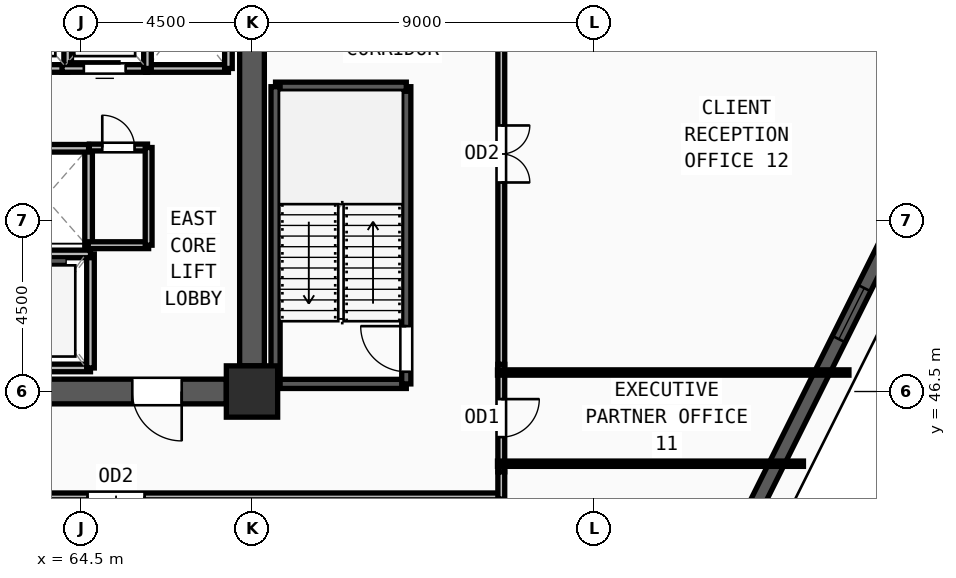
"""IFC4 building model, lengths in metres.
Left out: names, types, materials, properties, quantities, classifications, styles, units other than length and angle.
Written with IfcOpenShell. Run it as: python <this file> out.ifc"""

import sys

from ifc_helpers import new_model, si_unit, direction, frame, frame_2d, origin, origin_2d, place, context, subcontext, project, spatial, rectangle, extrude, source, transform, mapped, element, fill, save


model = new_model("IFC4")
c1 = context("Model", 3, precision=1e-05, world=origin(), true_north=direction((0.0, 1.0)))
c2 = subcontext(c1, "Body", "Model", "MODEL_VIEW")
j1 = project(units=[si_unit("LENGTHUNIT", "METRE"), si_unit("PLANEANGLEUNIT", "RADIAN")], contexts=[c1])
p1 = place(None, origin())
s1 = spatial("IfcSite", under=j1, at=p1, CompositionType="ELEMENT")
p2 = place(p1, origin())
s2 = spatial("IfcBuilding", under=s1, at=p2, CompositionType="ELEMENT")
p3 = place(p2, frame((0.0, 0.0, 194.25)))
s3 = spatial("IfcBuildingStorey", under=s2, at=p3, CompositionType="ELEMENT", Elevation=194.25)
m1 = source(origin(), c2, "Body", "SweptSolid", [
    extrude(rectangle(XDim=1.35, YDim=1.35, at=origin_2d()), origin(), (0.0, 0.0, 1.0), 3.75),
])
p4 = place(p3, frame((69.0, 46.5, 0.0), z_axis=(0.0, 0.0, 1.0), x_axis=(1.0, 0.0, 0.0)))
e1 = element("IfcColumn", 1, at=p4, inside=s3, PredefinedType="COLUMN", context=c2, shape_type="MappedRepresentation", body=[
    mapped(m1, transform((0.0, 0.0, 0.0), x_axis=(1.0, 0.0, 0.0), y_axis=(0.0, 1.0, 0.0), z_axis=(0.0, 0.0, 1.0), scale=1.0)),
])
p5 = place(p3, frame((80.452, 39.875, 0.0), z_axis=(0.0, 0.0, 1.0), x_axis=(0.446173861236, 0.894946303166, 0.0)))
e2 = element("IfcWall", 2, at=p5, inside=s3, PredefinedType="SOLIDWALL", context=c2, shape_type="SweptSolid", body=[
    extrude(rectangle(XDim=29.97, YDim=0.38, at=frame_2d((14.985, 0.0))), origin(), (0.0, 0.0, 1.0), 3.57),
])
m2 = source(origin(), c2, "Body", "SweptSolid", [
    extrude(rectangle(XDim=1.5, YDim=1.9, at=frame_2d((0.75, 0.95))), frame((0.0, 0.2, 0.0), z_axis=(0.0, -1.0, 0.0), x_axis=(1.0, 0.0, 0.0)), (0.0, 0.0, 1.0), 0.4),
])
p6 = place(p5, frame((8.943, 0.0, 0.55)))
e3 = element("IfcOpeningElement", 3, at=p6, cuts=e2, PredefinedType="OPENING", context=c2, shape_type="MappedRepresentation", body=[
    mapped(m2, transform((0.0, 0.0, 0.0), x_axis=(1.0, 0.0, 0.0), y_axis=(0.0, 1.0, 0.0), z_axis=(0.0, 0.0, 1.0), scale=1.0)),
])
p7 = place(p5, frame((14.235, 0.0, 0.55)))
e4 = element("IfcOpeningElement", 4, at=p7, cuts=e2, PredefinedType="OPENING", context=c2, shape_type="MappedRepresentation", body=[
    mapped(m2, transform((0.0, 0.0, 0.0), x_axis=(1.0, 0.0, 0.0), y_axis=(0.0, 1.0, 0.0), z_axis=(0.0, 0.0, 1.0), scale=1.0)),
])
p8 = place(p5, frame((21.728, 0.0, 0.55)))
e5 = element("IfcOpeningElement", 5, at=p8, cuts=e2, PredefinedType="OPENING", context=c2, shape_type="MappedRepresentation", body=[
    mapped(m2, transform((0.0, 0.0, 0.0), x_axis=(1.0, 0.0, 0.0), y_axis=(0.0, 1.0, 0.0), z_axis=(0.0, 0.0, 1.0), scale=1.0)),
])
p9 = place(p3, frame((69.0, 60.825, 0.0), z_axis=(0.0, 0.0, 1.0), x_axis=(0.0, -1.0, 0.0)))
e6 = element("IfcWall", 6, at=p9, inside=s3, PredefinedType="SHEAR", context=c2, shape_type="SweptSolid", body=[
    extrude(rectangle(XDim=13.65, YDim=0.65, at=frame_2d((6.825, 0.0))), origin(), (0.0, 0.0, 1.0), 3.57),
])
m3 = source(origin(), c2, "Body", "SweptSolid", [
    extrude(rectangle(XDim=1.2, YDim=2.2, at=frame_2d((0.6, 1.1))), frame((0.0, 0.335, 0.0), z_axis=(0.0, -1.0, 0.0), x_axis=(1.0, 0.0, 0.0)), (0.0, 0.0, 1.0), 0.67),
])
p10 = place(p9, frame((1.275, 0.0, 0.0)))
e7 = element("IfcOpeningElement", 7, at=p10, cuts=e6, PredefinedType="OPENING", context=c2, shape_type="MappedRepresentation", body=[
    mapped(m3, transform((0.0, 0.0, 0.0), x_axis=(1.0, 0.0, 0.0), y_axis=(0.0, 1.0, 0.0), z_axis=(0.0, 0.0, 1.0), scale=1.0)),
])
p11 = place(p3, frame((68.325, 46.5, 0.0), z_axis=(0.0, 0.0, 1.0), x_axis=(-1.0, 0.0, 0.0)))
e8 = element("IfcWall", 8, at=p11, inside=s3, PredefinedType="SHEAR", context=c2, shape_type="SweptSolid", body=[
    extrude(rectangle(XDim=7.65, YDim=0.65, at=frame_2d((3.825, 0.0))), origin(), (0.0, 0.0, 1.0), 3.57),
])
m4 = source(origin(), c2, "Body", "SweptSolid", [
    extrude(rectangle(XDim=1.3, YDim=2.2, at=frame_2d((0.65, 1.1))), frame((0.0, 0.335, 0.0), z_axis=(0.0, -1.0, 0.0), x_axis=(1.0, 0.0, 0.0)), (0.0, 0.0, 1.0), 0.67),
])
p12 = place(p11, frame((1.175, 0.0, 0.0)))
e9 = element("IfcOpeningElement", 9, at=p12, cuts=e8, PredefinedType="OPENING", context=c2, shape_type="MappedRepresentation", body=[
    mapped(m4, transform((0.0, 0.0, 0.0), x_axis=(1.0, 0.0, 0.0), y_axis=(0.0, 1.0, 0.0), z_axis=(0.0, 0.0, 1.0), scale=1.0)),
])
p13 = place(p3, frame((69.62, 46.7, 0.0), z_axis=(0.0, 0.0, 1.0), x_axis=(1.0, 0.0, 0.0)))
e10 = element("IfcWall", 10, at=p13, inside=s3, PredefinedType="SOLIDWALL", context=c2, shape_type="SweptSolid", body=[
    extrude(rectangle(XDim=3.44, YDim=0.24, at=frame_2d((1.72, 0.0))), origin(), (0.0, 0.0, 1.0), 3.57),
])
p14 = place(p3, frame((73.06, 46.7, 0.0), z_axis=(0.0, 0.0, 1.0), x_axis=(0.0, 1.0, 0.0)))
e11 = element("IfcWall", 11, at=p14, inside=s3, PredefinedType="SOLIDWALL", context=c2, shape_type="SweptSolid", body=[
    extrude(rectangle(XDim=7.82, YDim=0.24, at=frame_2d((3.91, 0.0))), origin(), (0.0, 0.0, 1.0), 3.57),
])
m5 = source(origin(), c2, "Body", "SweptSolid", [
    extrude(rectangle(XDim=1.2, YDim=2.2, at=frame_2d((0.6, 1.1))), frame((0.0, 0.13, 0.0), z_axis=(0.0, -1.0, 0.0), x_axis=(1.0, 0.0, 0.0)), (0.0, 0.0, 1.0), 0.26),
])
p15 = place(p14, frame((0.32, 0.0, 0.0)))
e12 = element("IfcOpeningElement", 12, at=p15, cuts=e11, PredefinedType="OPENING", context=c2, shape_type="MappedRepresentation", body=[
    mapped(m5, transform((0.0, 0.0, 0.0), x_axis=(1.0, 0.0, 0.0), y_axis=(0.0, 1.0, 0.0), z_axis=(0.0, 0.0, 1.0), scale=1.0)),
])
p16 = place(p3, frame((73.06, 54.52, 0.0), z_axis=(0.0, 0.0, 1.0), x_axis=(-1.0, 0.0, 0.0)))
e13 = element("IfcWall", 13, at=p16, inside=s3, PredefinedType="SOLIDWALL", context=c2, shape_type="SweptSolid", body=[
    extrude(rectangle(XDim=3.44, YDim=0.24, at=frame_2d((1.72, 0.0))), origin(), (0.0, 0.0, 1.0), 3.57),
])
p17 = place(p3, frame((69.62, 54.52, 0.0), z_axis=(0.0, 0.0, 1.0), x_axis=(0.0, -1.0, 0.0)))
e14 = element("IfcWall", 14, at=p17, inside=s3, PredefinedType="SOLIDWALL", context=c2, shape_type="SweptSolid", body=[
    extrude(rectangle(XDim=7.82, YDim=0.24, at=frame_2d((3.91, 0.0))), origin(), (0.0, 0.0, 1.0), 3.57),
])
p18 = place(p3, frame((62.35, 47.12, 0.0), z_axis=(0.0, 0.0, 1.0), x_axis=(1.0, 0.0, 0.0)))
e15 = element("IfcWall", 15, at=p18, inside=s3, PredefinedType="SOLIDWALL", context=c2, shape_type="SweptSolid", body=[
    extrude(rectangle(XDim=2.4, YDim=0.2, at=frame_2d((1.2, 0.0))), origin(), (0.0, 0.0, 1.0), 3.57),
])
p19 = place(p3, frame((64.75, 47.12, 0.0), z_axis=(0.0, 0.0, 1.0), x_axis=(0.0, 1.0, 0.0)))
e16 = element("IfcWall", 16, at=p19, inside=s3, PredefinedType="SOLIDWALL", context=c2, shape_type="SweptSolid", body=[
    extrude(rectangle(XDim=3.0, YDim=0.2, at=frame_2d((1.5, 0.0))), origin(), (0.0, 0.0, 1.0), 3.57),
])
p20 = place(p3, frame((64.75, 50.12, 0.0), z_axis=(0.0, 0.0, 1.0), x_axis=(-1.0, 0.0, 0.0)))
e17 = element("IfcWall", 17, at=p20, inside=s3, PredefinedType="SOLIDWALL", context=c2, shape_type="SweptSolid", body=[
    extrude(rectangle(XDim=2.4, YDim=0.2, at=frame_2d((1.2, 0.0))), origin(), (0.0, 0.0, 1.0), 3.57),
])
p21 = place(p3, frame((66.2, 55.0, 0.0), z_axis=(0.0, 0.0, 1.0), x_axis=(1.0, 0.0, 0.0)))
e18 = element("IfcWall", 18, at=p21, inside=s3, PredefinedType="SOLIDWALL", context=c2, shape_type="SweptSolid", body=[
    extrude(rectangle(XDim=2.18, YDim=0.2, at=frame_2d((1.09, 0.0))), origin(), (0.0, 0.0, 1.0), 3.57),
])
p22 = place(p3, frame((68.38, 55.0, 0.0), z_axis=(0.0, 0.0, 1.0), x_axis=(0.0, 1.0, 0.0)))
e19 = element("IfcWall", 19, at=p22, inside=s3, PredefinedType="SOLIDWALL", context=c2, shape_type="SweptSolid", body=[
    extrude(rectangle(XDim=2.75, YDim=0.2, at=frame_2d((1.375, 0.0))), origin(), (0.0, 0.0, 1.0), 3.57),
])
p23 = place(p3, frame((64.7, 50.3, 0.0), z_axis=(0.0, 0.0, 1.0), x_axis=(0.0, 1.0, 0.0)))
e20 = element("IfcWall", 20, at=p23, inside=s3, PredefinedType="SOLIDWALL", context=c2, shape_type="SweptSolid", body=[
    extrude(rectangle(XDim=2.6, YDim=0.2, at=frame_2d((1.3, 0.0))), origin(), (0.0, 0.0, 1.0), 3.57),
])
p24 = place(p3, frame((64.7, 52.9, 0.0), z_axis=(0.0, 0.0, 1.0), x_axis=(-1.0, 0.0, 0.0)))
e21 = element("IfcWall", 21, at=p24, inside=s3, PredefinedType="SOLIDWALL", context=c2, shape_type="SweptSolid", body=[
    extrude(rectangle(XDim=2.3, YDim=0.2, at=frame_2d((1.15, 0.0))), origin(), (0.0, 0.0, 1.0), 3.57),
])
p25 = place(p3, frame((61.9, 55.0, 0.0), z_axis=(0.0, 0.0, 1.0), x_axis=(1.0, 0.0, 0.0)))
e22 = element("IfcWall", 22, at=p25, inside=s3, PredefinedType="SOLIDWALL", context=c2, shape_type="SweptSolid", body=[
    extrude(rectangle(XDim=2.25, YDim=0.2, at=frame_2d((1.125, 0.0))), origin(), (0.0, 0.0, 1.0), 3.57),
])
m6 = source(origin(), c2, "Body", "SweptSolid", [
    extrude(rectangle(XDim=1.1, YDim=2.2, at=frame_2d((0.55, 1.1))), frame((0.0, 0.11, 0.0), z_axis=(0.0, -1.0, 0.0), x_axis=(1.0, 0.0, 0.0)), (0.0, 0.0, 1.0), 0.22),
])
p26 = place(p25, frame((0.575, 0.0, 0.0)))
e23 = element("IfcOpeningElement", 23, at=p26, cuts=e22, PredefinedType="OPENING", context=c2, shape_type="MappedRepresentation", body=[
    mapped(m6, transform((0.0, 0.0, 0.0), x_axis=(1.0, 0.0, 0.0), y_axis=(0.0, 1.0, 0.0), z_axis=(0.0, 0.0, 1.0), scale=1.0)),
])
p27 = place(p3, frame((64.15, 55.0, 0.0), z_axis=(0.0, 0.0, 1.0), x_axis=(0.0, 1.0, 0.0)))
e24 = element("IfcWall", 24, at=p27, inside=s3, PredefinedType="SOLIDWALL", context=c2, shape_type="SweptSolid", body=[
    extrude(rectangle(XDim=2.6, YDim=0.2, at=frame_2d((1.3, 0.0))), origin(), (0.0, 0.0, 1.0), 3.57),
])
p28 = place(p3, frame((64.0, 55.0, 0.0), z_axis=(0.0, 0.0, 1.0), x_axis=(1.0, 0.0, 0.0)))
e25 = element("IfcWall", 25, at=p28, inside=s3, PredefinedType="SOLIDWALL", context=c2, shape_type="SweptSolid", body=[
    extrude(rectangle(XDim=2.25, YDim=0.2, at=frame_2d((1.125, 0.0))), origin(), (0.0, 0.0, 1.0), 3.57),
])
p29 = place(p28, frame((0.575, 0.0, 0.0)))
e26 = element("IfcOpeningElement", 26, at=p29, cuts=e25, PredefinedType="OPENING", context=c2, shape_type="MappedRepresentation", body=[
    mapped(m6, transform((0.0, 0.0, 0.0), x_axis=(1.0, 0.0, 0.0), y_axis=(0.0, 1.0, 0.0), z_axis=(0.0, 0.0, 1.0), scale=1.0)),
])
p30 = place(p3, frame((66.25, 55.0, 0.0), z_axis=(0.0, 0.0, 1.0), x_axis=(0.0, 1.0, 0.0)))
e27 = element("IfcWall", 27, at=p30, inside=s3, PredefinedType="SOLIDWALL", context=c2, shape_type="SweptSolid", body=[
    extrude(rectangle(XDim=2.6, YDim=0.2, at=frame_2d((1.3, 0.0))), origin(), (0.0, 0.0, 1.0), 3.57),
])
p31 = place(p3, frame((64.72, 52.92, 0.0), z_axis=(0.0, 0.0, 1.0), x_axis=(1.0, 0.0, 0.0)))
e28 = element("IfcWall", 28, at=p31, inside=s3, PredefinedType="PARTITIONING", context=c2, shape_type="SweptSolid", body=[
    extrude(rectangle(XDim=1.53, YDim=0.18, at=frame_2d((0.765, 0.0))), origin(), (0.0, 0.0, 1.0), 3.57),
])
m7 = source(origin(), c2, "Body", "SweptSolid", [
    extrude(rectangle(XDim=0.85, YDim=2.1, at=frame_2d((0.425, 1.05))), frame((0.0, 0.1, 0.0), z_axis=(0.0, -1.0, 0.0), x_axis=(1.0, 0.0, 0.0)), (0.0, 0.0, 1.0), 0.2),
])
p32 = place(p31, frame((0.34, 0.0, 0.0)))
e29 = element("IfcOpeningElement", 29, at=p32, cuts=e28, PredefinedType="OPENING", context=c2, shape_type="MappedRepresentation", body=[
    mapped(m7, transform((0.0, 0.0, 0.0), x_axis=(1.0, 0.0, 0.0), y_axis=(0.0, 1.0, 0.0), z_axis=(0.0, 0.0, 1.0), scale=1.0)),
])
p33 = place(p3, frame((75.63, 43.74, 0.0), z_axis=(0.0, 0.0, 1.0), x_axis=(-1.0, 0.0, 0.0)))
e30 = element("IfcWall", 30, at=p33, inside=s3, PredefinedType="PARTITIONING", context=c2, shape_type="SweptSolid", body=[
    extrude(rectangle(XDim=20.415, YDim=0.18, at=frame_2d((10.208, 0.0))), origin(), (0.0, 0.0, 1.0), 3.57),
])
m8 = source(origin(), c2, "Body", "SweptSolid", [
    extrude(rectangle(XDim=1.5, YDim=2.2, at=frame_2d((0.75, 1.1))), frame((0.0, 0.1, 0.0), z_axis=(0.0, -1.0, 0.0), x_axis=(1.0, 0.0, 0.0)), (0.0, 0.0, 1.0), 0.2),
])
p34 = place(p33, frame((9.457, 0.0, 0.0)))
e31 = element("IfcOpeningElement", 31, at=p34, cuts=e30, PredefinedType="OPENING", context=c2, shape_type="MappedRepresentation", body=[
    mapped(m8, transform((0.0, 0.0, 0.0), x_axis=(1.0, 0.0, 0.0), y_axis=(0.0, 1.0, 0.0), z_axis=(0.0, 0.0, 1.0), scale=1.0)),
])
p35 = place(p3, frame((75.56, 47.215, 0.0), z_axis=(0.0, 0.0, 1.0), x_axis=(0.0, -1.0, 0.0)))
e32 = element("IfcWall", 32, at=p35, inside=s3, PredefinedType="PARTITIONING", context=c2, shape_type="SweptSolid", body=[
    extrude(rectangle(XDim=2.83, YDim=0.18, at=frame_2d((1.415, 0.0))), origin(), (0.0, 0.0, 1.0), 3.57),
])
m9 = source(origin(), c2, "Body", "SweptSolid", [
    extrude(rectangle(XDim=1.0, YDim=2.2, at=frame_2d((0.5, 1.1))), frame((0.0, 0.1, 0.0), z_axis=(0.0, -1.0, 0.0), x_axis=(1.0, 0.0, 0.0)), (0.0, 0.0, 1.0), 0.2),
])
p36 = place(p35, frame((0.915, 0.0, 0.0)))
e33 = element("IfcOpeningElement", 33, at=p36, cuts=e32, PredefinedType="OPENING", context=c2, shape_type="MappedRepresentation", body=[
    mapped(m9, transform((0.0, 0.0, 0.0), x_axis=(1.0, 0.0, 0.0), y_axis=(0.0, 1.0, 0.0), z_axis=(0.0, 0.0, 1.0), scale=1.0)),
])
p37 = place(p3, frame((75.56, 58.285, 0.0), z_axis=(0.0, 0.0, 1.0), x_axis=(0.0, -1.0, 0.0)))
e34 = element("IfcWall", 34, at=p37, inside=s3, PredefinedType="PARTITIONING", context=c2, shape_type="SweptSolid", body=[
    extrude(rectangle(XDim=11.07, YDim=0.18, at=frame_2d((5.535, 0.0))), origin(), (0.0, 0.0, 1.0), 3.57),
])
p38 = place(p37, frame((4.785, 0.0, 0.0)))
e35 = element("IfcOpeningElement", 35, at=p38, cuts=e34, PredefinedType="OPENING", context=c2, shape_type="MappedRepresentation", body=[
    mapped(m8, transform((0.0, 0.0, 0.0), x_axis=(1.0, 0.0, 0.0), y_axis=(0.0, 1.0, 0.0), z_axis=(0.0, 0.0, 1.0), scale=1.0)),
])
p39 = place(p3, frame((64.69, 50.35, 0.0), z_axis=(0.0, 0.0, 1.0), x_axis=(1.0, 0.0, 0.0)))
e36 = element("IfcWall", 36, at=p39, inside=s3, PredefinedType="PARTITIONING", context=c2, shape_type="SweptSolid", body=[
    extrude(rectangle(XDim=1.59, YDim=0.18, at=frame_2d((0.795, 0.0))), origin(), (0.0, 0.0, 1.0), 3.57),
])
p40 = place(p3, frame((66.28, 50.35, 0.0), z_axis=(0.0, 0.0, 1.0), x_axis=(0.0, 1.0, 0.0)))
e37 = element("IfcWall", 37, at=p40, inside=s3, PredefinedType="PARTITIONING", context=c2, shape_type="SweptSolid", body=[
    extrude(rectangle(XDim=2.57, YDim=0.18, at=frame_2d((1.285, 0.0))), origin(), (0.0, 0.0, 1.0), 3.57),
])
p41 = place(p3, frame((75.56, 44.385, 0.0), z_axis=(0.0, 0.0, 1.0), x_axis=(0.0, -1.0, 0.0)))
e38 = element("IfcWall", 38, at=p41, inside=s3, PredefinedType="PARTITIONING", context=c2, shape_type="SweptSolid", body=[
    extrude(rectangle(XDim=0.715, YDim=0.18, at=frame_2d((0.357, 0.0))), origin(), (0.0, 0.0, 1.0), 3.57),
])
p42 = place(p3, frame((75.46, 44.6, 0.0), z_axis=(0.0, 0.0, 1.0), x_axis=(1.0, 0.0, 0.0)))
e39 = element("IfcWall", 39, at=p42, inside=s3, PredefinedType="PARTITIONING", context=c2, shape_type="SweptSolid", body=[
    extrude(rectangle(XDim=8.051, YDim=0.14, at=frame_2d((4.025, 0.0))), origin(), (0.0, 0.0, 1.0), 3.57),
])
p43 = place(p3, frame((75.46, 47.0, 0.0), z_axis=(0.0, 0.0, 1.0), x_axis=(1.0, 0.0, 0.0)))
e40 = element("IfcWall", 40, at=p43, inside=s3, PredefinedType="PARTITIONING", context=c2, shape_type="SweptSolid", body=[
    extrude(rectangle(XDim=9.248, YDim=0.14, at=frame_2d((4.624, 0.0))), origin(), (0.0, 0.0, 1.0), 3.57),
])
m10 = source(origin(), c2, "Body", "SweptSolid", [
    extrude(rectangle(XDim=1.5, YDim=1.9, at=frame_2d((0.75, 0.95))), frame((0.0, 0.03, 0.0), z_axis=(0.0, -1.0, 0.0), x_axis=(1.0, 0.0, 0.0)), (0.0, 0.0, 1.0), 0.06),
])
p44 = place(p6, origin())
e41 = element("IfcWindow", 41, at=p44, inside=s3, PartitioningType="DOUBLE_PANEL_VERTICAL", PredefinedType="WINDOW", context=c2, shape_type="MappedRepresentation", body=[
    mapped(m10, transform((0.0, 0.0, 0.0), x_axis=(1.0, 0.0, 0.0), y_axis=(0.0, 1.0, 0.0), z_axis=(0.0, 0.0, 1.0), scale=1.0)),
])
fill(e3, e41)
m11 = source(origin(), c2, "Body", "SweptSolid", [
    extrude(rectangle(XDim=1.3, YDim=2.2, at=frame_2d((0.65, 1.1))), frame((0.0, 0.025, 0.0), z_axis=(0.0, -1.0, 0.0), x_axis=(1.0, 0.0, 0.0)), (0.0, 0.0, 1.0), 0.05),
])
p45 = place(p12, origin())
e42 = element("IfcDoor", 42, at=p45, inside=s3, OperationType="SINGLE_SWING_LEFT", PredefinedType="DOOR", context=c2, shape_type="MappedRepresentation", body=[
    mapped(m11, transform((0.0, 0.0, 0.0), x_axis=(1.0, 0.0, 0.0), y_axis=(0.0, 1.0, 0.0), z_axis=(0.0, 0.0, 1.0), scale=1.0)),
])
fill(e9, e42)
m12 = source(origin(), c2, "Body", "SweptSolid", [
    extrude(rectangle(XDim=1.2, YDim=2.2, at=frame_2d((0.6, 1.1))), frame((0.0, 0.025, 0.0), z_axis=(0.0, -1.0, 0.0), x_axis=(1.0, 0.0, 0.0)), (0.0, 0.0, 1.0), 0.05),
])
p46 = place(p15, origin())
e43 = element("IfcDoor", 43, at=p46, inside=s3, OperationType="SINGLE_SWING_RIGHT", PredefinedType="DOOR", context=c2, shape_type="MappedRepresentation", body=[
    mapped(m12, transform((0.0, 0.0, 0.0), x_axis=(1.0, 0.0, 0.0), y_axis=(0.0, 1.0, 0.0), z_axis=(0.0, 0.0, 1.0), scale=1.0)),
])
fill(e12, e43)
m13 = source(origin(), c2, "Body", "SweptSolid", [
    extrude(rectangle(XDim=1.1, YDim=2.2, at=frame_2d((0.55, 1.1))), frame((0.0, 0.025, 0.0), z_axis=(0.0, -1.0, 0.0), x_axis=(1.0, 0.0, 0.0)), (0.0, 0.0, 1.0), 0.05),
])
p47 = place(p29, origin())
e44 = element("IfcDoor", 44, at=p47, inside=s3, OperationType="SLIDING_TO_LEFT", PredefinedType="DOOR", context=c2, shape_type="MappedRepresentation", body=[
    mapped(m13, transform((0.0, 0.0, 0.0), x_axis=(1.0, 0.0, 0.0), y_axis=(0.0, 1.0, 0.0), z_axis=(0.0, 0.0, 1.0), scale=1.0)),
])
fill(e26, e44)
m14 = source(origin(), c2, "Body", "SweptSolid", [
    extrude(rectangle(XDim=0.85, YDim=2.1, at=frame_2d((0.425, 1.05))), frame((0.0, 0.025, 0.0), z_axis=(0.0, -1.0, 0.0), x_axis=(1.0, 0.0, 0.0)), (0.0, 0.0, 1.0), 0.05),
])
p48 = place(p32, origin())
e45 = element("IfcDoor", 45, at=p48, inside=s3, OperationType="SINGLE_SWING_LEFT", PredefinedType="DOOR", context=c2, shape_type="MappedRepresentation", body=[
    mapped(m14, transform((0.0, 0.0, 0.0), x_axis=(1.0, 0.0, 0.0), y_axis=(0.0, 1.0, 0.0), z_axis=(0.0, 0.0, 1.0), scale=1.0)),
])
fill(e29, e45)
m15 = source(origin(), c2, "Body", "SweptSolid", [
    extrude(rectangle(XDim=1.5, YDim=2.2, at=frame_2d((0.75, 1.1))), frame((0.0, 0.025, 0.0), z_axis=(0.0, -1.0, 0.0), x_axis=(1.0, 0.0, 0.0)), (0.0, 0.0, 1.0), 0.05),
])
p49 = place(p34, origin())
e46 = element("IfcDoor", 46, at=p49, inside=s3, OperationType="DOUBLE_DOOR_SINGLE_SWING", PredefinedType="DOOR", context=c2, shape_type="MappedRepresentation", body=[
    mapped(m15, transform((0.0, 0.0, 0.0), x_axis=(1.0, 0.0, 0.0), y_axis=(0.0, 1.0, 0.0), z_axis=(0.0, 0.0, 1.0), scale=1.0)),
])
fill(e31, e46)
m16 = source(origin(), c2, "Body", "SweptSolid", [
    extrude(rectangle(XDim=1.0, YDim=2.2, at=frame_2d((0.5, 1.1))), frame((0.0, 0.025, 0.0), z_axis=(0.0, -1.0, 0.0), x_axis=(1.0, 0.0, 0.0)), (0.0, 0.0, 1.0), 0.05),
])
p50 = place(p36, origin())
e47 = element("IfcDoor", 47, at=p50, inside=s3, OperationType="SINGLE_SWING_LEFT", PredefinedType="DOOR", context=c2, shape_type="MappedRepresentation", body=[
    mapped(m16, transform((0.0, 0.0, 0.0), x_axis=(1.0, 0.0, 0.0), y_axis=(0.0, 1.0, 0.0), z_axis=(0.0, 0.0, 1.0), scale=1.0)),
])
fill(e33, e47)
p51 = place(p38, origin())
e48 = element("IfcDoor", 48, at=p51, inside=s3, OperationType="DOUBLE_DOOR_SINGLE_SWING", PredefinedType="DOOR", context=c2, shape_type="MappedRepresentation", body=[
    mapped(m15, transform((0.0, 0.0, 0.0), x_axis=(1.0, 0.0, 0.0), y_axis=(0.0, 1.0, 0.0), z_axis=(0.0, 0.0, 1.0), scale=1.0)),
])
fill(e35, e48)
save(model, sys.argv[1])
